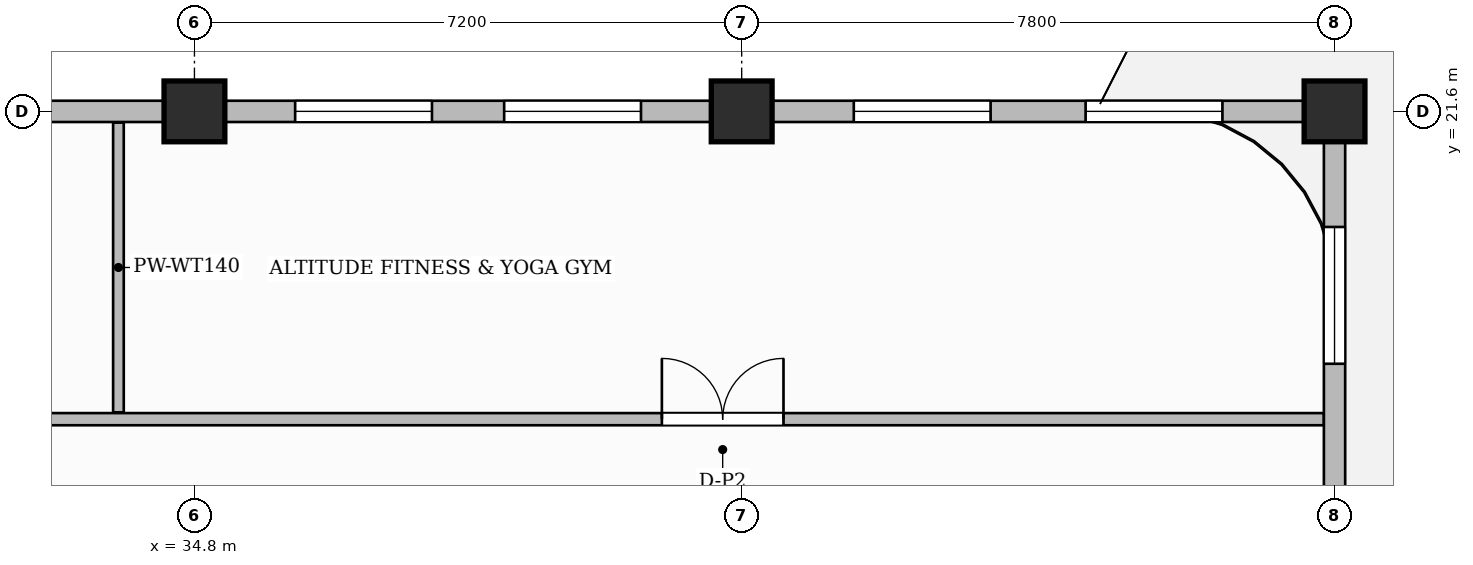
"""IFC4 building model, lengths in metres.
Left out: names, types, materials, properties, quantities, classifications, styles, units other than length and angle.
Written with IfcOpenShell. Run it as: python <this file> out.ifc"""

import sys

from ifc_helpers import new_model, si_unit, direction, frame, frame_2d, origin, origin_2d, place, context, subcontext, project, spatial, rectangle, extrude, source, transform, mapped, element, fill, save


model = new_model("IFC4")
c1 = context("Model", 3, precision=1e-05, world=origin(), true_north=direction((0.0, 1.0)))
c2 = subcontext(c1, "Body", "Model", "MODEL_VIEW")
j1 = project(units=[si_unit("LENGTHUNIT", "METRE"), si_unit("PLANEANGLEUNIT", "RADIAN")], contexts=[c1])
p1 = place(None, origin())
s1 = spatial("IfcSite", under=j1, at=p1, CompositionType="ELEMENT")
p2 = place(p1, origin())
s2 = spatial("IfcBuilding", under=s1, at=p2, CompositionType="ELEMENT")
p3 = place(p2, frame((0.0, 0.0, 267.35)))
s3 = spatial("IfcBuildingStorey", under=s2, at=p3, CompositionType="ELEMENT", Elevation=267.35)
m1 = source(origin(), c2, "Body", "SweptSolid", [
    extrude(rectangle(XDim=0.8, YDim=0.8, at=origin_2d()), origin(), (0.0, 0.0, 1.0), 3.85),
])
for number, where, z_axis, x_axis in (
    (1, (34.8, 21.6, 0.0), (0.0, 0.0, 1.0), (1.0, 0.0, 0.0)),
    (2, (42.0, 21.6, 0.0), (0.0, 0.0, 1.0), (1.0, 0.0, 0.0)),
    (3, (49.8, 21.6, 0.0), (0.0, 0.0, 1.0), (1.0, 0.0, 0.0)),
):
    element("IfcColumn", number, at=place(p3, frame(where, z_axis=z_axis, x_axis=x_axis)), inside=s3, PredefinedType="COLUMN", context=c2, shape_type="MappedRepresentation", body=[
        mapped(m1, transform((0.0, 0.0, 0.0), scale=1.0)),
    ])
p4 = place(p3, frame((30.29, 17.55, 0.0), z_axis=(0.0, 0.0, 1.0), x_axis=(1.0, 0.0, 0.0)))
e4 = element("IfcWall", 4, at=p4, inside=s3, PredefinedType="PARTITIONING", context=c2, shape_type="SweptSolid", body=[
    extrude(rectangle(XDim=19.37, YDim=0.16, at=frame_2d((9.685, 0.0))), origin(), (0.0, 0.0, 1.0), 3.6),
])
p5 = place(p4, frame((1.285, 0.0, 0.0)))
e5 = element("IfcOpeningElement", 5, at=p5, cuts=e4, PredefinedType="OPENING", context=c2, shape_type="SweptSolid", body=[
    extrude(rectangle(XDim=0.85, YDim=2.1, at=frame_2d((0.425, 1.05))), frame((0.0, 0.09, 0.0), z_axis=(0.0, -1.0, 0.0), x_axis=(1.0, 0.0, 0.0)), (0.0, 0.0, 1.0), 0.18),
])
p6 = place(p4, frame((10.66, 0.0, 0.0)))
e6 = element("IfcOpeningElement", 6, at=p6, cuts=e4, PredefinedType="OPENING", context=c2, shape_type="SweptSolid", body=[
    extrude(rectangle(XDim=1.6, YDim=2.4, at=frame_2d((0.8, 1.2))), frame((0.0, 0.09, 0.0), z_axis=(0.0, -1.0, 0.0), x_axis=(1.0, 0.0, 0.0)), (0.0, 0.0, 1.0), 0.18),
])
p7 = place(p3, frame((33.8, 17.64, 0.0), z_axis=(0.0, 0.0, 1.0), x_axis=(0.0, 1.0, 0.0)))
e7 = element("IfcWall", 7, at=p7, inside=s3, PredefinedType="PARTITIONING", context=c2, shape_type="SweptSolid", body=[
    extrude(rectangle(XDim=3.812, YDim=0.14, at=frame_2d((1.906, 0.0))), origin(), (0.0, 0.0, 1.0), 3.6),
])
p8 = place(p3, frame((49.8, 14.62, 0.0), z_axis=(0.0, 0.0, 1.0), x_axis=(0.0, 1.0, 0.0)))
e8 = element("IfcWall", 8, at=p8, inside=s3, PredefinedType="SOLIDWALL", context=c2, shape_type="SweptSolid", body=[
    extrude(rectangle(XDim=6.93, YDim=0.28, at=frame_2d((3.465, 0.0))), origin(), (0.0, 0.0, 1.0), 3.185),
])
p9 = place(p8, frame((0.42, 0.0, 0.0)))
e9 = element("IfcOpeningElement", 9, at=p9, cuts=e8, PredefinedType="OPENING", context=c2, shape_type="SweptSolid", body=[
    extrude(rectangle(XDim=1.2, YDim=2.2, at=frame_2d((0.6, 1.1))), frame((0.0, 0.15, 0.0), z_axis=(0.0, -1.0, 0.0), x_axis=(1.0, 0.0, 0.0)), (0.0, 0.0, 1.0), 0.3),
])
p10 = place(p8, frame((3.659, 0.0, 0.8)))
e10 = element("IfcOpeningElement", 10, at=p10, cuts=e8, PredefinedType="OPENING", context=c2, shape_type="SweptSolid", body=[
    extrude(rectangle(XDim=1.8, YDim=1.85, at=frame_2d((0.9, 0.925))), frame((0.0, 0.15, 0.0), z_axis=(0.0, -1.0, 0.0), x_axis=(1.0, 0.0, 0.0)), (0.0, 0.0, 1.0), 0.3),
])
p11 = place(p3, frame((18.0, 21.6, 0.0), z_axis=(0.0, 0.0, 1.0), x_axis=(1.0, 0.0, 0.0)))
e11 = element("IfcWall", 11, at=p11, inside=s3, PredefinedType="SOLIDWALL", context=c2, shape_type="SweptSolid", body=[
    extrude(rectangle(XDim=31.8, YDim=0.28, at=frame_2d((15.9, 0.0))), origin(), (0.0, 0.0, 1.0), 3.185),
])
p12 = place(p11, frame((0.42, 0.0, 0.0)))
e12 = element("IfcOpeningElement", 12, at=p12, cuts=e11, PredefinedType="OPENING", context=c2, shape_type="SweptSolid", body=[
    extrude(rectangle(XDim=1.2, YDim=2.2, at=frame_2d((0.6, 1.1))), frame((0.0, 0.15, 0.0), z_axis=(0.0, -1.0, 0.0), x_axis=(1.0, 0.0, 0.0)), (0.0, 0.0, 1.0), 0.3),
])
p13 = place(p11, frame((4.581, 0.0, 0.8)))
e13 = element("IfcOpeningElement", 13, at=p13, cuts=e11, PredefinedType="OPENING", context=c2, shape_type="SweptSolid", body=[
    extrude(rectangle(XDim=0.95, YDim=1.75, at=frame_2d((0.475, 0.875))), frame((0.0, 0.15, 0.0), z_axis=(0.0, -1.0, 0.0), x_axis=(1.0, 0.0, 0.0)), (0.0, 0.0, 1.0), 0.3),
])
p14 = place(p11, frame((6.3, 0.0, 0.8)))
e14 = element("IfcOpeningElement", 14, at=p14, cuts=e11, PredefinedType="OPENING", context=c2, shape_type="SweptSolid", body=[
    extrude(rectangle(XDim=1.8, YDim=1.85, at=frame_2d((0.9, 0.925))), frame((0.0, 0.15, 0.0), z_axis=(0.0, -1.0, 0.0), x_axis=(1.0, 0.0, 0.0)), (0.0, 0.0, 1.0), 0.3),
])
p15 = place(p11, frame((8.869, 0.0, 0.8)))
e15 = element("IfcOpeningElement", 15, at=p15, cuts=e11, PredefinedType="OPENING", context=c2, shape_type="SweptSolid", body=[
    extrude(rectangle(XDim=0.95, YDim=1.75, at=frame_2d((0.475, 0.875))), frame((0.0, 0.15, 0.0), z_axis=(0.0, -1.0, 0.0), x_axis=(1.0, 0.0, 0.0)), (0.0, 0.0, 1.0), 0.3),
])
p16 = place(p11, frame((13.101, 0.0, 0.8)))
e16 = element("IfcOpeningElement", 16, at=p16, cuts=e11, PredefinedType="OPENING", context=c2, shape_type="SweptSolid", body=[
    extrude(rectangle(XDim=1.8, YDim=1.85, at=frame_2d((0.9, 0.925))), frame((0.0, 0.15, 0.0), z_axis=(0.0, -1.0, 0.0), x_axis=(1.0, 0.0, 0.0)), (0.0, 0.0, 1.0), 0.3),
])
p17 = place(p11, frame((18.125, 0.0, 0.8)))
e17 = element("IfcOpeningElement", 17, at=p17, cuts=e11, PredefinedType="OPENING", context=c2, shape_type="SweptSolid", body=[
    extrude(rectangle(XDim=1.8, YDim=1.85, at=frame_2d((0.9, 0.925))), frame((0.0, 0.15, 0.0), z_axis=(0.0, -1.0, 0.0), x_axis=(1.0, 0.0, 0.0)), (0.0, 0.0, 1.0), 0.3),
])
p18 = place(p11, frame((20.875, 0.0, 0.8)))
e18 = element("IfcOpeningElement", 18, at=p18, cuts=e11, PredefinedType="OPENING", context=c2, shape_type="SweptSolid", body=[
    extrude(rectangle(XDim=1.8, YDim=1.85, at=frame_2d((0.9, 0.925))), frame((0.0, 0.15, 0.0), z_axis=(0.0, -1.0, 0.0), x_axis=(1.0, 0.0, 0.0)), (0.0, 0.0, 1.0), 0.3),
])
p19 = place(p11, frame((25.475, 0.0, 0.8)))
e19 = element("IfcOpeningElement", 19, at=p19, cuts=e11, PredefinedType="OPENING", context=c2, shape_type="SweptSolid", body=[
    extrude(rectangle(XDim=1.8, YDim=1.85, at=frame_2d((0.9, 0.925))), frame((0.0, 0.15, 0.0), z_axis=(0.0, -1.0, 0.0), x_axis=(1.0, 0.0, 0.0)), (0.0, 0.0, 1.0), 0.3),
])
p20 = place(p11, frame((28.525, 0.0, 0.8)))
e20 = element("IfcOpeningElement", 20, at=p20, cuts=e11, PredefinedType="OPENING", context=c2, shape_type="SweptSolid", body=[
    extrude(rectangle(XDim=1.8, YDim=1.85, at=frame_2d((0.9, 0.925))), frame((0.0, 0.15, 0.0), z_axis=(0.0, -1.0, 0.0), x_axis=(1.0, 0.0, 0.0)), (0.0, 0.0, 1.0), 0.3),
])
m2 = source(origin(), c2, "Body", "SweptSolid", [
    extrude(rectangle(XDim=1.6, YDim=2.4, at=frame_2d((0.8, 1.2))), frame((0.0, 0.025, 0.0), z_axis=(0.0, -1.0, 0.0), x_axis=(1.0, 0.0, 0.0)), (0.0, 0.0, 1.0), 0.05),
])
p21 = place(p6, origin())
e21 = element("IfcDoor", 21, at=p21, inside=s3, OperationType="DOUBLE_DOOR_SINGLE_SWING", PredefinedType="DOOR", context=c2, shape_type="MappedRepresentation", body=[
    mapped(m2, transform((0.0, 0.0, 0.0), scale=1.0)),
])
fill(e6, e21)
m3 = source(origin(), c2, "Body", "SweptSolid", [
    extrude(rectangle(XDim=1.8, YDim=1.85, at=frame_2d((0.9, 0.925))), frame((0.0, 0.03, 0.0), z_axis=(0.0, -1.0, 0.0), x_axis=(1.0, 0.0, 0.0)), (0.0, 0.0, 1.0), 0.06),
])
p22 = place(p10, origin())
e22 = element("IfcWindow", 22, at=p22, inside=s3, PartitioningType="DOUBLE_PANEL_VERTICAL", PredefinedType="WINDOW", context=c2, shape_type="MappedRepresentation", body=[
    mapped(m3, transform((0.0, 0.0, 0.0), scale=1.0)),
])
fill(e10, e22)
p23 = place(p17, origin())
e23 = element("IfcWindow", 23, at=p23, inside=s3, PartitioningType="DOUBLE_PANEL_VERTICAL", PredefinedType="WINDOW", context=c2, shape_type="MappedRepresentation", body=[
    mapped(m3, transform((0.0, 0.0, 0.0), scale=1.0)),
])
fill(e17, e23)
p24 = place(p18, origin())
e24 = element("IfcWindow", 24, at=p24, inside=s3, PartitioningType="DOUBLE_PANEL_VERTICAL", PredefinedType="WINDOW", context=c2, shape_type="MappedRepresentation", body=[
    mapped(m3, transform((0.0, 0.0, 0.0), scale=1.0)),
])
fill(e18, e24)
p25 = place(p19, origin())
e25 = element("IfcWindow", 25, at=p25, inside=s3, PartitioningType="DOUBLE_PANEL_VERTICAL", PredefinedType="WINDOW", context=c2, shape_type="MappedRepresentation", body=[
    mapped(m3, transform((0.0, 0.0, 0.0), scale=1.0)),
])
fill(e19, e25)
p26 = place(p20, origin())
e26 = element("IfcWindow", 26, at=p26, inside=s3, PartitioningType="DOUBLE_PANEL_VERTICAL", PredefinedType="WINDOW", context=c2, shape_type="MappedRepresentation", body=[
    mapped(m3, transform((0.0, 0.0, 0.0), scale=1.0)),
])
fill(e20, e26)
save(model, sys.argv[1])
